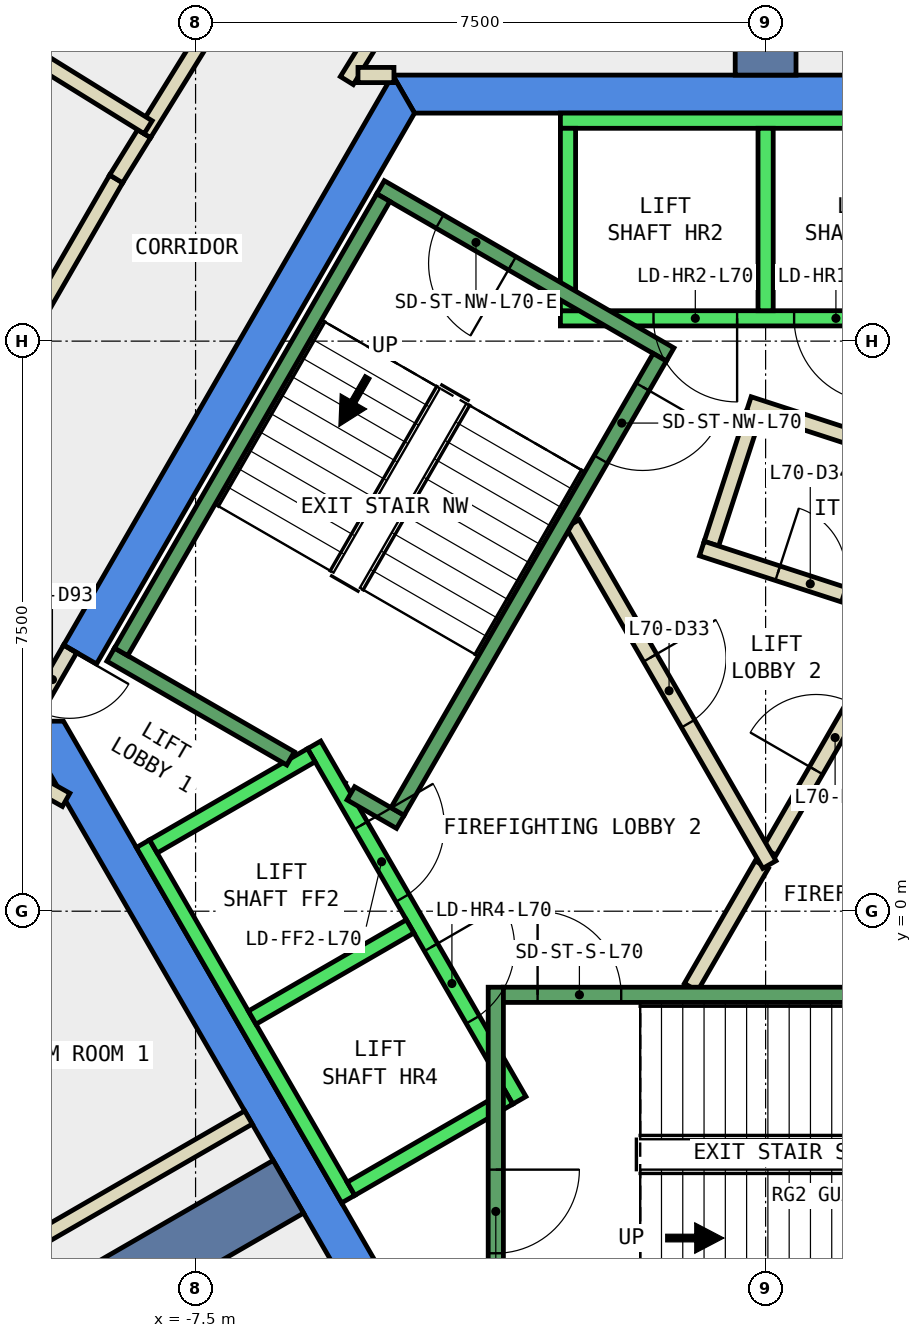
"""IFC4 building model, lengths in metres.
Left out: names, types, materials, properties, quantities, classifications, styles, units other than length and angle.
Written with IfcOpenShell. Run it as: python <this file> out.ifc"""

import sys

from ifc_helpers import new_model, si_unit, direction, frame, frame_2d, origin, place, context, subcontext, project, spatial, polyline, rectangle, outline, extrude, element, fill, save


model = new_model("IFC4")
c1 = context("Model", 3, precision=1e-05, world=origin(), true_north=direction((0.0, 1.0)))
c2 = subcontext(c1, "Body", "Model", "MODEL_VIEW")
j1 = project(units=[si_unit("LENGTHUNIT", "METRE"), si_unit("PLANEANGLEUNIT", "RADIAN")], contexts=[c1])
p1 = place(None, origin())
s1 = spatial("IfcSite", under=j1, at=p1, CompositionType="ELEMENT")
p2 = place(p1, origin())
s2 = spatial("IfcBuilding", under=s1, at=p2, CompositionType="ELEMENT")
p3 = place(p2, frame((0.0, 0.0, 300.8)))
s3 = spatial("IfcBuildingStorey", under=s2, at=p3, CompositionType="ELEMENT", Elevation=300.8)
p4 = place(p3, frame((0.0, 0.0, -0.34)))
e1 = element("IfcWall", 1, at=p4, inside=s3, PredefinedType="SHEAR", context=c2, shape_type="SweptSolid", body=[
    extrude(outline(polyline([(4.907, 11.0), (-4.907, 11.0), (-4.619, 10.5), (4.619, 10.5), (4.907, 11.0)])), origin(), (0.0, 0.0, 1.0), 3.6),
])
p5 = place(p3, frame((0.0, 0.0, -0.34)))
e2 = element("IfcWall", 2, at=p5, inside=s3, PredefinedType="SHEAR", context=c2, shape_type="SweptSolid", body=[
    extrude(outline(polyline([(-9.236, 3.502), (-8.803, 3.253), (-4.619, 10.5), (-4.907, 11.0), (-9.236, 3.502)])), origin(), (0.0, 0.0, 1.0), 3.6),
])
p6 = place(p3, frame((0.0, 0.0, -0.34)))
e3 = element("IfcWall", 3, at=p6, inside=s3, PredefinedType="SHEAR", context=c2, shape_type="SweptSolid", body=[
    extrude(outline(polyline([(-9.815, 2.5), (-4.907, -6.0), (-4.619, -5.5), (-9.238, 2.5), (-9.815, 2.5)])), origin(), (0.0, 0.0, 1.0), 3.6),
])
p7 = place(p3, frame((0.0, 11.0, -0.34), z_axis=(0.0, 0.0, 1.0), x_axis=(0.0, 1.0, 0.0)))
e4 = element("IfcWall", 4, at=p7, inside=s3, PredefinedType="SHEAR", context=c2, shape_type="SweptSolid", body=[
    extrude(rectangle(XDim=9.0, YDim=0.8, at=frame_2d((4.5, 0.0))), origin(), (0.0, 0.0, 1.0), 3.6),
])
p8 = place(p3, frame((-6.279, -3.625, -0.34), z_axis=(0.0, 0.0, 1.0), x_axis=(-0.866017533419, -0.500013631625, 0.0)))
e5 = element("IfcWall", 5, at=p8, inside=s3, PredefinedType="SHEAR", context=c2, shape_type="SweptSolid", body=[
    extrude(rectangle(XDim=9.0, YDim=0.8, at=frame_2d((4.5, 0.0))), origin(), (0.0, 0.0, 1.0), 3.6),
])
p9 = place(p3, frame((2.06, 5.931, 0.0), z_axis=(0.0, 0.0, 1.0), x_axis=(-0.95092855133, 0.309410552932, 0.0)))
e6 = element("IfcWall", 6, at=p9, inside=s3, PredefinedType="PARTITIONING", context=c2, shape_type="SweptSolid", body=[
    extrude(rectangle(XDim=2.399, YDim=0.2, at=frame_2d((1.199, 0.0))), origin(), (0.0, 0.0, 1.0), 3.26),
])
p10 = place(p3, frame((-0.157, 6.547, 0.0), z_axis=(0.0, 0.0, 1.0), x_axis=(-0.308813127339, -0.951122732555, 0.0)))
e7 = element("IfcWall", 7, at=p10, inside=s3, PredefinedType="PARTITIONING", context=c2, shape_type="SweptSolid", body=[
    extrude(rectangle(XDim=1.8, YDim=0.2, at=frame_2d((0.9, 0.0))), origin(), (0.0, 0.0, 1.0), 3.26),
])
p11 = place(p3, frame((-0.839, 4.771, 0.0), z_axis=(0.0, 0.0, 1.0), x_axis=(0.950961084355, -0.309310549515, 0.0)))
e8 = element("IfcWall", 8, at=p11, inside=s3, PredefinedType="PARTITIONING", context=c2, shape_type="SweptSolid", body=[
    extrude(rectangle(XDim=3.0, YDim=0.2, at=frame_2d((1.5, 0.0))), origin(), (0.0, 0.0, 1.0), 3.26),
])
p12 = place(p11, frame((1.05, 0.0, 0.0)))
e9 = element("IfcOpeningElement", 9, at=p12, cuts=e8, PredefinedType="OPENING", context=c2, shape_type="SweptSolid", body=[
    extrude(rectangle(XDim=0.9, YDim=2.1, at=frame_2d((0.45, 1.05))), frame((0.0, 0.11, 0.0), z_axis=(0.0, -1.0, 0.0), x_axis=(1.0, 0.0, 0.0)), (0.0, 0.0, 1.0), 0.22),
])
p13 = place(p3, frame((-2.969, 15.033, 0.0), z_axis=(0.0, 0.0, 1.0), x_axis=(-0.526330241425, -0.85028023437, 0.0)))
e10 = element("IfcWall", 10, at=p13, inside=s3, PredefinedType="PARTITIONING", context=c2, shape_type="SweptSolid", body=[
    extrude(rectangle(XDim=4.828, YDim=0.2, at=frame_2d((2.414, 0.0))), origin(), (0.0, 0.0, 1.0), 3.26),
])
p14 = place(p13, frame((1.514, 0.0, 0.0)))
e11 = element("IfcOpeningElement", 11, at=p14, cuts=e10, PredefinedType="OPENING", context=c2, shape_type="SweptSolid", body=[
    extrude(rectangle(XDim=1.8, YDim=2.1, at=frame_2d((0.9, 1.05))), frame((0.0, 0.11, 0.0), z_axis=(0.0, -1.0, 0.0), x_axis=(1.0, 0.0, 0.0)), (0.0, 0.0, 1.0), 0.22),
])
p15 = place(p3, frame((-5.363, 11.001, 0.0), z_axis=(0.0, 0.0, 1.0), x_axis=(1.0, 0.0, 0.0)))
e12 = element("IfcWall", 12, at=p15, inside=s3, PredefinedType="PARTITIONING", context=c2, shape_type="SweptSolid", body=[
    extrude(rectangle(XDim=0.473, YDim=0.2, at=frame_2d((0.237, 0.0))), origin(), (0.0, 0.0, 1.0), 3.26),
])
p16 = place(p3, frame((-9.203, 1.465, 0.0), z_axis=(0.0, 0.0, 1.0), x_axis=(-0.872243753731, 0.489071399775, 0.0)))
e13 = element("IfcWall", 13, at=p16, inside=s3, PredefinedType="PARTITIONING", context=c2, shape_type="SweptSolid", body=[
    extrude(rectangle(XDim=1.715, YDim=0.2, at=frame_2d((0.858, 0.0))), origin(), (0.0, 0.0, 1.0), 3.26),
])
p17 = place(p3, frame((-10.543, 6.174, 0.0), z_axis=(0.0, 0.0, 1.0), x_axis=(0.50008212199, 0.86597798544, 0.0)))
e14 = element("IfcWall", 14, at=p17, inside=s3, PredefinedType="PARTITIONING", context=c2, shape_type="SweptSolid", body=[
    extrude(rectangle(XDim=3.995, YDim=0.2, at=frame_2d((1.998, 0.0))), origin(), (0.0, 0.0, 1.0), 3.26),
])
p18 = place(p3, frame((-8.545, 9.634, 0.0), z_axis=(0.0, 0.0, 1.0), x_axis=(0.52594604986, 0.85051793199, 0.0)))
e15 = element("IfcWall", 15, at=p18, inside=s3, PredefinedType="PARTITIONING", context=c2, shape_type="SweptSolid", body=[
    extrude(rectangle(XDim=0.699, YDim=0.2, at=frame_2d((0.35, 0.0))), origin(), (0.0, 0.0, 1.0), 3.26),
])
p19 = place(p3, frame((-8.177, 10.229, 0.0), z_axis=(0.0, 0.0, 1.0), x_axis=(0.526504295939, 0.850172468595, 0.0)))
e16 = element("IfcWall", 16, at=p19, inside=s3, PredefinedType="PARTITIONING", context=c2, shape_type="SweptSolid", body=[
    extrude(rectangle(XDim=3.2, YDim=0.2, at=frame_2d((1.6, 0.0))), origin(), (0.0, 0.0, 1.0), 3.26),
])
p20 = place(p3, frame((-0.982, -1.0, 0.0), z_axis=(0.0, 0.0, 1.0), x_axis=(0.50024047865, 0.865886518847, 0.0)))
e17 = element("IfcWall", 17, at=p20, inside=s3, PredefinedType="PARTITIONING", context=c2, shape_type="SweptSolid", body=[
    extrude(rectangle(XDim=1.863, YDim=0.2, at=frame_2d((0.931, 0.0))), origin(), (0.0, 0.0, 1.0), 3.26),
])
p21 = place(p3, frame((0.05, 0.787, 0.0), z_axis=(0.0, 0.0, 1.0), x_axis=(0.499954076797, 0.866051915934, 0.0)))
e18 = element("IfcWall", 18, at=p21, inside=s3, PredefinedType="PARTITIONING", context=c2, shape_type="SweptSolid", body=[
    extrude(rectangle(XDim=3.558, YDim=0.2, at=frame_2d((1.779, 0.0))), origin(), (0.0, 0.0, 1.0), 3.26),
])
p22 = place(p21, frame((1.229, 0.0, 0.0)))
e19 = element("IfcOpeningElement", 19, at=p22, cuts=e18, PredefinedType="OPENING", context=c2, shape_type="SweptSolid", body=[
    extrude(rectangle(XDim=1.0, YDim=2.1, at=frame_2d((0.5, 1.05))), frame((0.0, 0.11, 0.0), z_axis=(0.0, -1.0, 0.0), x_axis=(1.0, 0.0, 0.0)), (0.0, 0.0, 1.0), 0.22),
])
p23 = place(p3, frame((-2.54, 5.1, 0.0), z_axis=(0.0, 0.0, 1.0), x_axis=(0.499925051871, -0.866068670783, 0.0)))
e20 = element("IfcWall", 20, at=p23, inside=s3, PredefinedType="PARTITIONING", context=c2, shape_type="SweptSolid", body=[
    extrude(rectangle(XDim=5.181, YDim=0.2, at=frame_2d((2.59, 0.0))), origin(), (0.0, 0.0, 1.0), 3.26),
])
p24 = place(p23, frame((2.04, 0.0, 0.0)))
e21 = element("IfcOpeningElement", 21, at=p24, cuts=e20, PredefinedType="OPENING", context=c2, shape_type="SweptSolid", body=[
    extrude(rectangle(XDim=1.0, YDim=2.1, at=frame_2d((0.5, 1.05))), frame((0.0, 0.11, 0.0), z_axis=(0.0, -1.0, 0.0), x_axis=(1.0, 0.0, 0.0)), (0.0, 0.0, 1.0), 0.22),
])
p25 = place(p3, frame((-6.804, -2.714, 0.0), z_axis=(0.0, 0.0, 1.0), x_axis=(-0.866057565063, -0.499944290893, 0.0)))
e22 = element("IfcWall", 22, at=p25, inside=s3, PredefinedType="PARTITIONING", context=c2, shape_type="SweptSolid", body=[
    extrude(rectangle(XDim=6.7, YDim=0.2, at=frame_2d((3.35, 0.0))), origin(), (0.0, 0.0, 1.0), 3.26),
])
p26 = place(p3, frame((-10.42, 11.736, 0.0), z_axis=(0.0, 0.0, 1.0), x_axis=(0.850124477172, -0.52658178217, 0.0)))
e23 = element("IfcWall", 23, at=p26, inside=s3, PredefinedType="PARTITIONING", context=c2, shape_type="SweptSolid", body=[
    extrude(rectangle(XDim=2.701, YDim=0.2, at=frame_2d((1.35, 0.0))), origin(), (0.0, 0.0, 1.0), 3.26),
])
p27 = place(p3, frame((-9.15, 3.452, 0.0), z_axis=(0.0, 0.0, 1.0), x_axis=(-0.500079945886, -0.865979242085, 0.0)))
e24 = element("IfcWall", 24, at=p27, inside=s3, PredefinedType="PARTITIONING", context=c2, shape_type="SweptSolid", body=[
    extrude(rectangle(XDim=0.926, YDim=0.2, at=frame_2d((0.463, 0.0))), origin(), (0.0, 0.0, 1.0), 2.4),
])
p28 = place(p27, frame((0.017, 0.0, 0.0)))
e25 = element("IfcOpeningElement", 25, at=p28, cuts=e24, PredefinedType="OPENING", context=c2, shape_type="SweptSolid", body=[
    extrude(rectangle(XDim=0.9, YDim=2.1, at=frame_2d((0.45, 1.05))), frame((0.0, 0.11, 0.0), z_axis=(0.0, -1.0, 0.0), x_axis=(1.0, 0.0, 0.0)), (0.0, 0.0, 1.0), 0.22),
])
p29 = place(p3, frame((2.7, 7.8, 0.0), z_axis=(0.0, 0.0, 1.0), x_axis=(-1.0, 0.0, 0.0)))
e26 = element("IfcWall", 26, at=p29, inside=s3, PredefinedType="STANDARD", context=c2, shape_type="SweptSolid", body=[
    extrude(rectangle(XDim=5.4, YDim=0.2, at=frame_2d((2.7, 0.0))), origin(), (0.0, 0.0, 1.0), 3.26),
])
p30 = place(p29, frame((1.225, 0.0, 0.0)))
e27 = element("IfcOpeningElement", 27, at=p30, cuts=e26, PredefinedType="OPENING", context=c2, shape_type="SweptSolid", body=[
    extrude(rectangle(XDim=1.1, YDim=2.1, at=frame_2d((0.55, 1.05))), frame((0.0, 0.11, 0.0), z_axis=(0.0, -1.0, 0.0), x_axis=(1.0, 0.0, 0.0)), (0.0, 0.0, 1.0), 0.22),
])
p31 = place(p29, frame((3.075, 0.0, 0.0)))
e28 = element("IfcOpeningElement", 28, at=p31, cuts=e26, PredefinedType="OPENING", context=c2, shape_type="SweptSolid", body=[
    extrude(rectangle(XDim=1.1, YDim=2.1, at=frame_2d((0.55, 1.05))), frame((0.0, 0.11, 0.0), z_axis=(0.0, -1.0, 0.0), x_axis=(1.0, 0.0, 0.0)), (0.0, 0.0, 1.0), 0.22),
])
p32 = place(p3, frame((2.7, 10.4, 0.0), z_axis=(0.0, 0.0, 1.0), x_axis=(-1.0, 0.0, 0.0)))
e29 = element("IfcWall", 29, at=p32, inside=s3, PredefinedType="STANDARD", context=c2, shape_type="SweptSolid", body=[
    extrude(rectangle(XDim=5.4, YDim=0.2, at=frame_2d((2.7, 0.0))), origin(), (0.0, 0.0, 1.0), 3.26),
])
for number, where, z_axis, x_axis in (
    (30, (0.0, 7.9, 0.0), (0.0, 0.0, 1.0), (0.0, 1.0, 0.0)),
    (31, (-2.6, 7.9, 0.0), (0.0, 0.0, 1.0), (0.0, 1.0, 0.0)),
):
    element("IfcWall", number, at=place(p3, frame(where, z_axis=z_axis, x_axis=x_axis)), inside=s3, PredefinedType="STANDARD", context=c2, shape_type="SweptSolid", body=[
        extrude(rectangle(XDim=2.4, YDim=0.2, at=frame_2d((1.2, 0.0))), origin(), (0.0, 0.0, 1.0), 3.26),
    ])
p33 = place(p3, frame((-5.94, 2.188, 0.0), z_axis=(0.0, 0.0, 1.0), x_axis=(0.500034260056, -0.866005622828, 0.0)))
e32 = element("IfcWall", 32, at=p33, inside=s3, PredefinedType="STANDARD", context=c2, shape_type="SweptSolid", body=[
    extrude(rectangle(XDim=5.399, YDim=0.2, at=frame_2d((2.7, 0.0))), origin(), (0.0, 0.0, 1.0), 3.26),
])
p34 = place(p33, frame((3.075, 0.0, 0.0)))
e33 = element("IfcOpeningElement", 33, at=p34, cuts=e32, PredefinedType="OPENING", context=c2, shape_type="SweptSolid", body=[
    extrude(rectangle(XDim=1.1, YDim=2.1, at=frame_2d((0.55, 1.05))), frame((0.0, 0.11, 0.0), z_axis=(0.0, -1.0, 0.0), x_axis=(1.0, 0.0, 0.0)), (0.0, 0.0, 1.0), 0.22),
])
p35 = place(p33, frame((1.225, 0.0, 0.0)))
e34 = element("IfcOpeningElement", 34, at=p35, cuts=e32, PredefinedType="OPENING", context=c2, shape_type="SweptSolid", body=[
    extrude(rectangle(XDim=1.1, YDim=2.1, at=frame_2d((0.55, 1.05))), frame((0.0, 0.11, 0.0), z_axis=(0.0, -1.0, 0.0), x_axis=(1.0, 0.0, 0.0)), (0.0, 0.0, 1.0), 0.22),
])
p36 = place(p3, frame((-8.192, 0.888, 0.0), z_axis=(0.0, 0.0, 1.0), x_axis=(0.500034260056, -0.866005622828, 0.0)))
e35 = element("IfcWall", 35, at=p36, inside=s3, PredefinedType="STANDARD", context=c2, shape_type="SweptSolid", body=[
    extrude(rectangle(XDim=5.399, YDim=0.2, at=frame_2d((2.7, 0.0))), origin(), (0.0, 0.0, 1.0), 3.26),
])
for number, where, z_axis, x_axis in (
    (36, (-5.977, 2.052, 0.0), (0.0, 0.0, 1.0), (-0.866, -0.5, 0.0)),
    (37, (-4.677, -0.2, 0.0), (0.0, 0.0, 1.0), (-0.866, -0.5, 0.0)),
):
    element("IfcWall", number, at=place(p3, frame(where, z_axis=z_axis, x_axis=x_axis)), inside=s3, PredefinedType="STANDARD", context=c2, shape_type="SweptSolid", body=[
        extrude(rectangle(XDim=2.399, YDim=0.2, at=frame_2d((1.2, 0.0))), origin(), (0.0, 0.0, 1.0), 3.26),
    ])
p37 = place(p3, frame((-3.377, -2.452, 0.0), z_axis=(0.0, 0.0, 1.0), x_axis=(-0.865955154139, -0.50012165622, 0.0)))
e38 = element("IfcWall", 38, at=p37, inside=s3, PredefinedType="STANDARD", context=c2, shape_type="SweptSolid", body=[
    extrude(rectangle(XDim=2.4, YDim=0.2, at=frame_2d((1.2, 0.0))), origin(), (0.0, 0.0, 1.0), 3.26),
])
p38 = place(p3, frame((-3.55, -1.0, 0.0), z_axis=(0.0, 0.0, 1.0), x_axis=(0.0, -1.0, 0.0)))
e39 = element("IfcWall", 39, at=p38, inside=s3, PredefinedType="STANDARD", context=c2, shape_type="SweptSolid", body=[
    extrude(rectangle(XDim=4.4, YDim=0.2, at=frame_2d((2.2, 0.0))), origin(), (0.0, 0.0, 1.0), 3.26),
])
p39 = place(p38, frame((2.4, 0.0, 0.0)))
e40 = element("IfcOpeningElement", 40, at=p39, cuts=e39, PredefinedType="OPENING", context=c2, shape_type="SweptSolid", body=[
    extrude(rectangle(XDim=1.1, YDim=2.2, at=frame_2d((0.55, 1.1))), frame((0.0, 0.11, 0.0), z_axis=(0.0, -1.0, 0.0), x_axis=(1.0, 0.0, 0.0)), (0.0, 0.0, 1.0), 0.22),
])
p40 = place(p3, frame((-3.45, -1.1, 0.0), z_axis=(0.0, 0.0, 1.0), x_axis=(1.0, 0.0, 0.0)))
e41 = element("IfcWall", 41, at=p40, inside=s3, PredefinedType="STANDARD", context=c2, shape_type="SweptSolid", body=[
    extrude(rectangle(XDim=6.9, YDim=0.2, at=frame_2d((3.45, 0.0))), origin(), (0.0, 0.0, 1.0), 3.26),
])
p41 = place(p40, frame((0.45, 0.0, 0.0)))
e42 = element("IfcOpeningElement", 42, at=p41, cuts=e41, PredefinedType="OPENING", context=c2, shape_type="SweptSolid", body=[
    extrude(rectangle(XDim=1.1, YDim=2.2, at=frame_2d((0.55, 1.1))), frame((0.0, 0.11, 0.0), z_axis=(0.0, -1.0, 0.0), x_axis=(1.0, 0.0, 0.0)), (0.0, 0.0, 1.0), 0.22),
])
p42 = place(p3, frame((-1.256, 7.324, 0.0), z_axis=(0.0, 0.0, 1.0), x_axis=(-0.866046073146, 0.499964197906, 0.0)))
e43 = element("IfcWall", 43, at=p42, inside=s3, PredefinedType="STANDARD", context=c2, shape_type="SweptSolid", body=[
    extrude(rectangle(XDim=4.4, YDim=0.2, at=frame_2d((2.2, 0.0))), origin(), (0.0, 0.0, 1.0), 3.26),
])
p43 = place(p42, frame((2.4, 0.0, 0.0)))
e44 = element("IfcOpeningElement", 44, at=p43, cuts=e43, PredefinedType="OPENING", context=c2, shape_type="SweptSolid", body=[
    extrude(rectangle(XDim=1.1, YDim=2.2, at=frame_2d((0.55, 1.1))), frame((0.0, 0.11, 0.0), z_axis=(0.0, -1.0, 0.0), x_axis=(1.0, 0.0, 0.0)), (0.0, 0.0, 1.0), 0.22),
])
p44 = place(p3, frame((-6.25, 2.01, 0.0), z_axis=(0.0, 0.0, 1.0), x_axis=(-0.86611865017, 0.499838457731, 0.0)))
e45 = element("IfcWall", 45, at=p44, inside=s3, PredefinedType="STANDARD", context=c2, shape_type="SweptSolid", body=[
    extrude(rectangle(XDim=2.733, YDim=0.2, at=frame_2d((1.366, 0.0))), origin(), (0.0, 0.0, 1.0), 3.26),
])
p45 = place(p3, frame((-4.806, 1.176, 0.0), z_axis=(0.0, 0.0, 1.0), x_axis=(-0.866558586415, 0.499075361355, 0.0)))
e46 = element("IfcWall", 46, at=p45, inside=s3, PredefinedType="STANDARD", context=c2, shape_type="SweptSolid", body=[
    extrude(rectangle(XDim=0.751, YDim=0.2, at=frame_2d((0.376, 0.0))), origin(), (0.0, 0.0, 1.0), 3.26),
])
p46 = place(p3, frame((-1.393, 7.288, 0.0), z_axis=(0.0, 0.0, 1.0), x_axis=(-0.499963383562, -0.866046543262, 0.0)))
e47 = element("IfcWall", 47, at=p46, inside=s3, PredefinedType="STANDARD", context=c2, shape_type="SweptSolid", body=[
    extrude(rectangle(XDim=6.9, YDim=0.2, at=frame_2d((3.45, 0.0))), origin(), (0.0, 0.0, 1.0), 3.26),
])
p47 = place(p46, frame((0.45, 0.0, 0.0)))
e48 = element("IfcOpeningElement", 48, at=p47, cuts=e47, PredefinedType="OPENING", context=c2, shape_type="SweptSolid", body=[
    extrude(rectangle(XDim=1.1, YDim=2.2, at=frame_2d((0.55, 1.1))), frame((0.0, 0.11, 0.0), z_axis=(0.0, -1.0, 0.0), x_axis=(1.0, 0.0, 0.0)), (0.0, 0.0, 1.0), 0.22),
])
p48 = place(p3, frame((-5.03, 9.388, 0.0), z_axis=(0.0, 0.0, 1.0), x_axis=(-0.499978703459, -0.866037698999, 0.0)))
e49 = element("IfcWall", 49, at=p48, inside=s3, PredefinedType="STANDARD", context=c2, shape_type="SweptSolid", body=[
    extrude(rectangle(XDim=6.9, YDim=0.2, at=frame_2d((3.45, 0.0))), origin(), (0.0, 0.0, 1.0), 3.26),
])
p49 = place(p22, origin())
e50 = element("IfcDoor", 50, at=p49, inside=s3, OperationType="SINGLE_SWING_RIGHT", PredefinedType="DOOR", context=c2, shape_type="SweptSolid", body=[
    extrude(rectangle(XDim=1.0, YDim=2.1, at=frame_2d((0.5, 1.05))), frame((0.0, 0.025, 0.0), z_axis=(0.0, -1.0, 0.0), x_axis=(1.0, 0.0, 0.0)), (0.0, 0.0, 1.0), 0.05),
])
fill(e19, e50)
p50 = place(p24, origin())
e51 = element("IfcDoor", 51, at=p50, inside=s3, OperationType="SINGLE_SWING_RIGHT", PredefinedType="DOOR", context=c2, shape_type="SweptSolid", body=[
    extrude(rectangle(XDim=1.0, YDim=2.1, at=frame_2d((0.5, 1.05))), frame((0.0, 0.025, 0.0), z_axis=(0.0, -1.0, 0.0), x_axis=(1.0, 0.0, 0.0)), (0.0, 0.0, 1.0), 0.05),
])
fill(e21, e51)
p51 = place(p12, origin())
e52 = element("IfcDoor", 52, at=p51, inside=s3, OperationType="SINGLE_SWING_LEFT", PredefinedType="DOOR", context=c2, shape_type="SweptSolid", body=[
    extrude(rectangle(XDim=0.9, YDim=2.1, at=frame_2d((0.45, 1.05))), frame((0.0, 0.025, 0.0), z_axis=(0.0, -1.0, 0.0), x_axis=(1.0, 0.0, 0.0)), (0.0, 0.0, 1.0), 0.05),
])
fill(e9, e52)
p52 = place(p28, origin())
e53 = element("IfcDoor", 53, at=p52, inside=s3, OperationType="SINGLE_SWING_LEFT", PredefinedType="DOOR", context=c2, shape_type="SweptSolid", body=[
    extrude(rectangle(XDim=0.9, YDim=2.1, at=frame_2d((0.45, 1.05))), frame((0.0, 0.025, 0.0), z_axis=(0.0, -1.0, 0.0), x_axis=(1.0, 0.0, 0.0)), (0.0, 0.0, 1.0), 0.05),
])
fill(e25, e53)
p53 = place(p30, origin())
e54 = element("IfcDoor", 54, at=p53, inside=s3, OperationType="SLIDING_TO_LEFT", PredefinedType="DOOR", context=c2, shape_type="SweptSolid", body=[
    extrude(rectangle(XDim=1.1, YDim=2.1, at=frame_2d((0.55, 1.05))), frame((0.0, 0.025, 0.0), z_axis=(0.0, -1.0, 0.0), x_axis=(1.0, 0.0, 0.0)), (0.0, 0.0, 1.0), 0.05),
])
fill(e27, e54)
p54 = place(p31, origin())
e55 = element("IfcDoor", 55, at=p54, inside=s3, OperationType="SLIDING_TO_LEFT", PredefinedType="DOOR", context=c2, shape_type="SweptSolid", body=[
    extrude(rectangle(XDim=1.1, YDim=2.1, at=frame_2d((0.55, 1.05))), frame((0.0, 0.025, 0.0), z_axis=(0.0, -1.0, 0.0), x_axis=(1.0, 0.0, 0.0)), (0.0, 0.0, 1.0), 0.05),
])
fill(e28, e55)
p55 = place(p34, origin())
e56 = element("IfcDoor", 56, at=p55, inside=s3, OperationType="SLIDING_TO_LEFT", PredefinedType="DOOR", context=c2, shape_type="SweptSolid", body=[
    extrude(rectangle(XDim=1.1, YDim=2.1, at=frame_2d((0.55, 1.05))), frame((0.0, 0.025, 0.0), z_axis=(0.0, -1.0, 0.0), x_axis=(1.0, 0.0, 0.0)), (0.0, 0.0, 1.0), 0.05),
])
fill(e33, e56)
p56 = place(p35, origin())
e57 = element("IfcDoor", 57, at=p56, inside=s3, OperationType="SLIDING_TO_LEFT", PredefinedType="DOOR", context=c2, shape_type="SweptSolid", body=[
    extrude(rectangle(XDim=1.1, YDim=2.1, at=frame_2d((0.55, 1.05))), frame((0.0, 0.025, 0.0), z_axis=(0.0, -1.0, 0.0), x_axis=(1.0, 0.0, 0.0)), (0.0, 0.0, 1.0), 0.05),
])
fill(e34, e57)
p57 = place(p41, origin())
e58 = element("IfcDoor", 58, at=p57, inside=s3, OperationType="SINGLE_SWING_LEFT", PredefinedType="DOOR", context=c2, shape_type="SweptSolid", body=[
    extrude(rectangle(XDim=1.1, YDim=2.2, at=frame_2d((0.55, 1.1))), frame((0.0, 0.025, 0.0), z_axis=(0.0, -1.0, 0.0), x_axis=(1.0, 0.0, 0.0)), (0.0, 0.0, 1.0), 0.05),
])
fill(e42, e58)
p58 = place(p39, origin())
e59 = element("IfcDoor", 59, at=p58, inside=s3, OperationType="SINGLE_SWING_LEFT", PredefinedType="DOOR", context=c2, shape_type="SweptSolid", body=[
    extrude(rectangle(XDim=1.1, YDim=2.2, at=frame_2d((0.55, 1.1))), frame((0.0, 0.025, 0.0), z_axis=(0.0, -1.0, 0.0), x_axis=(1.0, 0.0, 0.0)), (0.0, 0.0, 1.0), 0.05),
])
fill(e40, e59)
p59 = place(p47, origin())
e60 = element("IfcDoor", 60, at=p59, inside=s3, OperationType="SINGLE_SWING_LEFT", PredefinedType="DOOR", context=c2, shape_type="SweptSolid", body=[
    extrude(rectangle(XDim=1.1, YDim=2.2, at=frame_2d((0.55, 1.1))), frame((0.0, 0.025, 0.0), z_axis=(0.0, -1.0, 0.0), x_axis=(1.0, 0.0, 0.0)), (0.0, 0.0, 1.0), 0.05),
])
fill(e48, e60)
p60 = place(p43, origin())
e61 = element("IfcDoor", 61, at=p60, inside=s3, OperationType="SINGLE_SWING_LEFT", PredefinedType="DOOR", context=c2, shape_type="SweptSolid", body=[
    extrude(rectangle(XDim=1.1, YDim=2.2, at=frame_2d((0.55, 1.1))), frame((0.0, 0.025, 0.0), z_axis=(0.0, -1.0, 0.0), x_axis=(1.0, 0.0, 0.0)), (0.0, 0.0, 1.0), 0.05),
])
fill(e44, e61)
save(model, sys.argv[1])
